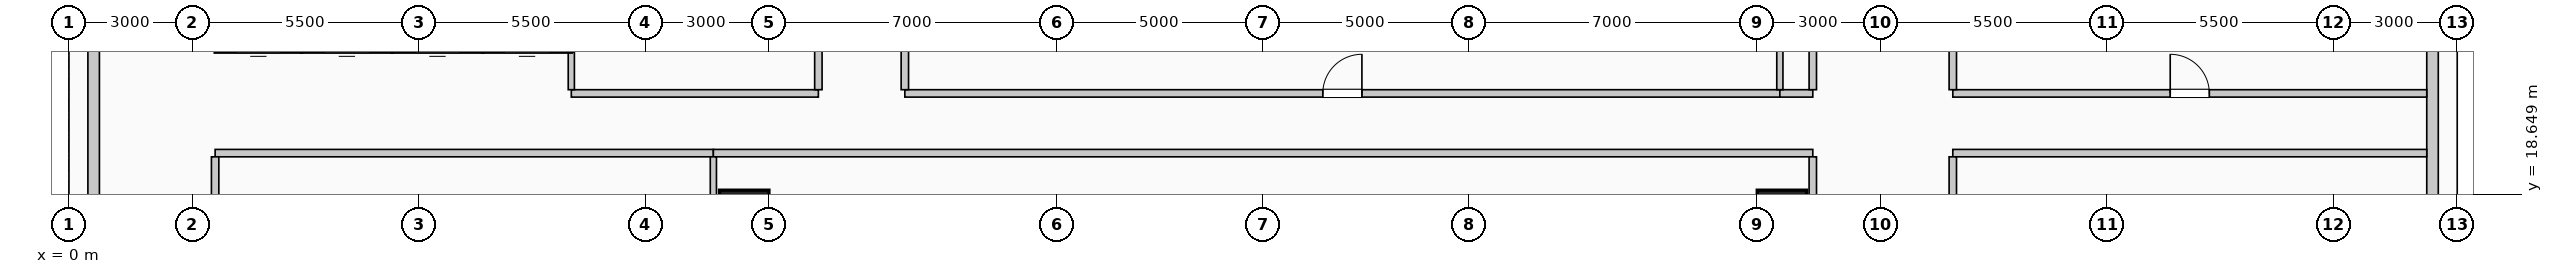
"""IFC4 building model, lengths in metres.
Left out: names, types, materials, properties, quantities, classifications, styles, units other than length and angle.
Written with IfcOpenShell. Run it as: python <this file> out.ifc"""

import sys

from ifc_helpers import new_model, si_unit, direction, frame, frame_2d, origin, origin_2d, place, context, subcontext, project, spatial, rectangle, extrude, element, fill, save


model = new_model("IFC4")
c1 = context("Model", 3, precision=1e-05, world=origin(), true_north=direction((0.0, 1.0)))
c2 = subcontext(c1, "Body", "Model", "MODEL_VIEW")
j1 = project(units=[si_unit("LENGTHUNIT", "METRE"), si_unit("PLANEANGLEUNIT", "RADIAN")], contexts=[c1])
p1 = place(None, origin())
s1 = spatial("IfcSite", under=j1, at=p1, CompositionType="ELEMENT")
p2 = place(p1, origin())
s2 = spatial("IfcBuilding", under=s1, at=p2, CompositionType="ELEMENT")
p3 = place(p2, frame((0.0, 0.0, 54.6)))
s3 = spatial("IfcBuildingStorey", under=s2, at=p3, CompositionType="ELEMENT", Elevation=54.6)
for number, where, z_axis, x_axis in (
    (1, (16.4, 18.0, 0.0), (0.0, 0.0, 1.0), (1.0, 0.0, 0.0)),
    (2, (41.6, 18.0, 0.0), (0.0, 0.0, 1.0), (1.0, 0.0, 0.0)),
):
    element("IfcColumn", number, at=place(p3, frame(where, z_axis=z_axis, x_axis=x_axis)), inside=s3, PredefinedType="COLUMN", context=c2, shape_type="SweptSolid", body=[
        extrude(rectangle(XDim=1.2, YDim=1.5, at=origin_2d()), origin(), (0.0, 0.0, 1.0), 4.0),
    ])
for number, where, z_axis, x_axis in (
    (3, (0.6, 18.47, 0.0), (0.0, 0.0, 1.0), (0.0, 1.0, 0.0)),
    (4, (57.4, 25.53, 0.0), (0.0, 0.0, 1.0), (0.0, -1.0, 0.0)),
):
    element("IfcWall", number, at=place(p3, frame(where, z_axis=z_axis, x_axis=x_axis)), inside=s3, PredefinedType="SOLIDWALL", context=c2, shape_type="SweptSolid", body=[
        extrude(rectangle(XDim=7.06, YDim=0.28, at=frame_2d((3.53, 0.0))), origin(), (0.0, 0.0, 1.0), 2.85),
    ])
p4 = place(p3, frame((5.65, 22.25, 0.0), z_axis=(0.0, 0.0, 1.0), x_axis=(-1.0, 0.0, 0.0)))
e5 = element("IfcWall", 5, at=p4, inside=s3, PredefinedType="SOLIDWALL", context=c2, shape_type="SweptSolid", body=[
    extrude(rectangle(XDim=2.1, YDim=0.3, at=frame_2d((1.05, 0.0))), origin(), (0.0, 0.0, 1.0), 4.0),
])
p5 = place(p4, frame((0.5, 0.0, 0.0)))
e6 = element("IfcOpeningElement", 6, at=p5, cuts=e5, PredefinedType="OPENING", context=c2, shape_type="SweptSolid", body=[
    extrude(rectangle(XDim=1.1, YDim=2.2, at=frame_2d((0.55, 1.1))), frame((0.0, 0.16, 0.0), z_axis=(0.0, -1.0, 0.0), x_axis=(1.0, 0.0, 0.0)), (0.0, 0.0, 1.0), 0.32),
])
p6 = place(p3, frame((7.85, 22.25, 0.0), z_axis=(0.0, 0.0, 1.0), x_axis=(-1.0, 0.0, 0.0)))
e7 = element("IfcWall", 7, at=p6, inside=s3, PredefinedType="SOLIDWALL", context=c2, shape_type="SweptSolid", body=[
    extrude(rectangle(XDim=2.2, YDim=0.3, at=frame_2d((1.1, 0.0))), origin(), (0.0, 0.0, 1.0), 4.0),
])
p7 = place(p6, frame((0.55, 0.0, 0.0)))
e8 = element("IfcOpeningElement", 8, at=p7, cuts=e7, PredefinedType="OPENING", context=c2, shape_type="SweptSolid", body=[
    extrude(rectangle(XDim=1.1, YDim=2.2, at=frame_2d((0.55, 1.1))), frame((0.0, 0.16, 0.0), z_axis=(0.0, -1.0, 0.0), x_axis=(1.0, 0.0, 0.0)), (0.0, 0.0, 1.0), 0.32),
])
p8 = place(p3, frame((10.05, 22.25, 0.0), z_axis=(0.0, 0.0, 1.0), x_axis=(-1.0, 0.0, 0.0)))
e9 = element("IfcWall", 9, at=p8, inside=s3, PredefinedType="SOLIDWALL", context=c2, shape_type="SweptSolid", body=[
    extrude(rectangle(XDim=2.2, YDim=0.3, at=frame_2d((1.1, 0.0))), origin(), (0.0, 0.0, 1.0), 4.0),
])
p9 = place(p8, frame((0.55, 0.0, 0.0)))
e10 = element("IfcOpeningElement", 10, at=p9, cuts=e9, PredefinedType="OPENING", context=c2, shape_type="SweptSolid", body=[
    extrude(rectangle(XDim=1.1, YDim=2.2, at=frame_2d((0.55, 1.1))), frame((0.0, 0.16, 0.0), z_axis=(0.0, -1.0, 0.0), x_axis=(1.0, 0.0, 0.0)), (0.0, 0.0, 1.0), 0.32),
])
p10 = place(p3, frame((12.2, 22.25, 0.0), z_axis=(0.0, 0.0, 1.0), x_axis=(-1.0, 0.0, 0.0)))
e11 = element("IfcWall", 11, at=p10, inside=s3, PredefinedType="SOLIDWALL", context=c2, shape_type="SweptSolid", body=[
    extrude(rectangle(XDim=2.15, YDim=0.3, at=frame_2d((1.075, 0.0))), origin(), (0.0, 0.0, 1.0), 4.0),
])
p11 = place(p10, frame((0.525, 0.0, 0.0)))
e12 = element("IfcOpeningElement", 12, at=p11, cuts=e11, PredefinedType="OPENING", context=c2, shape_type="SweptSolid", body=[
    extrude(rectangle(XDim=1.1, YDim=2.2, at=frame_2d((0.55, 1.1))), frame((0.0, 0.16, 0.0), z_axis=(0.0, -1.0, 0.0), x_axis=(1.0, 0.0, 0.0)), (0.0, 0.0, 1.0), 0.32),
])
p12 = place(p3, frame((3.55, 19.65, 0.0), z_axis=(0.0, 0.0, 1.0), x_axis=(1.0, 0.0, 0.0)))
e13 = element("IfcWall", 13, at=p12, inside=s3, PredefinedType="PARTITIONING", context=c2, shape_type="SweptSolid", body=[
    extrude(rectangle(XDim=12.1, YDim=0.18, at=frame_2d((6.05, 0.0))), origin(), (0.0, 0.0, 1.0), 3.7),
])
p13 = place(p3, frame((15.65, 19.65, 0.0), z_axis=(0.0, 0.0, 1.0), x_axis=(1.0, 0.0, 0.0)))
e14 = element("IfcWall", 14, at=p13, inside=s3, PredefinedType="PARTITIONING", context=c2, shape_type="SweptSolid", body=[
    extrude(rectangle(XDim=26.7, YDim=0.18, at=frame_2d((13.35, 0.0))), origin(), (0.0, 0.0, 1.0), 3.7),
])
p14 = place(p3, frame((45.75, 19.65, 0.0), z_axis=(0.0, 0.0, 1.0), x_axis=(1.0, 0.0, 0.0)))
e15 = element("IfcWall", 15, at=p14, inside=s3, PredefinedType="PARTITIONING", context=c2, shape_type="SweptSolid", body=[
    extrude(rectangle(XDim=11.51, YDim=0.18, at=frame_2d((5.755, 0.0))), origin(), (0.0, 0.0, 1.0), 3.7),
])
p15 = place(p3, frame((12.2, 21.1, 0.0), z_axis=(0.0, 0.0, 1.0), x_axis=(1.0, 0.0, 0.0)))
e16 = element("IfcWall", 16, at=p15, inside=s3, PredefinedType="PARTITIONING", context=c2, shape_type="SweptSolid", body=[
    extrude(rectangle(XDim=6.0, YDim=0.18, at=frame_2d((3.0, 0.0))), origin(), (0.0, 0.0, 1.0), 3.7),
])
p16 = place(p3, frame((20.3, 21.1, 0.0), z_axis=(0.0, 0.0, 1.0), x_axis=(1.0, 0.0, 0.0)))
e17 = element("IfcWall", 17, at=p16, inside=s3, PredefinedType="PARTITIONING", context=c2, shape_type="SweptSolid", body=[
    extrude(rectangle(XDim=21.25, YDim=0.18, at=frame_2d((10.625, 0.0))), origin(), (0.0, 0.0, 1.0), 3.7),
])
p17 = place(p16, frame((10.15, 0.0, 0.0)))
e18 = element("IfcOpeningElement", 18, at=p17, cuts=e17, PredefinedType="OPENING", context=c2, shape_type="SweptSolid", body=[
    extrude(rectangle(XDim=0.95, YDim=2.15, at=frame_2d((0.475, 1.075))), frame((0.0, 0.1, 0.0), z_axis=(0.0, -1.0, 0.0), x_axis=(1.0, 0.0, 0.0)), (0.0, 0.0, 1.0), 0.2),
])
p18 = place(p3, frame((41.55, 21.1, 0.0), z_axis=(0.0, 0.0, 1.0), x_axis=(1.0, 0.0, 0.0)))
e19 = element("IfcWall", 19, at=p18, inside=s3, PredefinedType="PARTITIONING", context=c2, shape_type="SweptSolid", body=[
    extrude(rectangle(XDim=0.8, YDim=0.18, at=frame_2d((0.4, 0.0))), origin(), (0.0, 0.0, 1.0), 3.7),
])
p19 = place(p3, frame((45.75, 21.1, 0.0), z_axis=(0.0, 0.0, 1.0), x_axis=(1.0, 0.0, 0.0)))
e20 = element("IfcWall", 20, at=p19, inside=s3, PredefinedType="PARTITIONING", context=c2, shape_type="SweptSolid", body=[
    extrude(rectangle(XDim=11.51, YDim=0.18, at=frame_2d((5.755, 0.0))), origin(), (0.0, 0.0, 1.0), 3.7),
])
p20 = place(p19, frame((5.28, 0.0, 0.0)))
e21 = element("IfcOpeningElement", 21, at=p20, cuts=e20, PredefinedType="OPENING", context=c2, shape_type="SweptSolid", body=[
    extrude(rectangle(XDim=0.95, YDim=2.15, at=frame_2d((0.475, 1.075))), frame((0.0, 0.1, 0.0), z_axis=(0.0, -1.0, 0.0), x_axis=(1.0, 0.0, 0.0)), (0.0, 0.0, 1.0), 0.2),
])
p21 = place(p3, frame((3.55, 16.39, 0.0), z_axis=(0.0, 0.0, 1.0), x_axis=(0.0, 1.0, 0.0)))
e22 = element("IfcWall", 22, at=p21, inside=s3, PredefinedType="PARTITIONING", context=c2, shape_type="SweptSolid", body=[
    extrude(rectangle(XDim=3.17, YDim=0.18, at=frame_2d((1.585, 0.0))), origin(), (0.0, 0.0, 1.0), 3.7),
])
p22 = place(p3, frame((12.2, 21.19, 0.0), z_axis=(0.0, 0.0, 1.0), x_axis=(0.0, 1.0, 0.0)))
e23 = element("IfcWall", 23, at=p22, inside=s3, PredefinedType="PARTITIONING", context=c2, shape_type="SweptSolid", body=[
    extrude(rectangle(XDim=0.91, YDim=0.15, at=frame_2d((0.455, 0.0))), origin(), (0.0, 0.0, 1.0), 3.7),
])
p23 = place(p3, frame((15.65, 16.39, 0.0), z_axis=(0.0, 0.0, 1.0), x_axis=(0.0, 1.0, 0.0)))
e24 = element("IfcWall", 24, at=p23, inside=s3, PredefinedType="PARTITIONING", context=c2, shape_type="SweptSolid", body=[
    extrude(rectangle(XDim=3.17, YDim=0.15, at=frame_2d((1.585, 0.0))), origin(), (0.0, 0.0, 1.0), 3.7),
])
for number, where, z_axis, x_axis in (
    (25, (18.2, 21.19, 0.0), (0.0, 0.0, 1.0), (0.0, 1.0, 0.0)),
    (26, (20.3, 21.19, 0.0), (0.0, 0.0, 1.0), (0.0, 1.0, 0.0)),
):
    element("IfcWall", number, at=place(p3, frame(where, z_axis=z_axis, x_axis=x_axis)), inside=s3, PredefinedType="PARTITIONING", context=c2, shape_type="SweptSolid", body=[
        extrude(rectangle(XDim=10.52, YDim=0.18, at=frame_2d((5.26, 0.0))), origin(), (0.0, 0.0, 1.0), 3.7),
    ])
p24 = place(p3, frame((41.55, 21.19, 0.0), z_axis=(0.0, 0.0, 1.0), x_axis=(0.0, 1.0, 0.0)))
e27 = element("IfcWall", 27, at=p24, inside=s3, PredefinedType="PARTITIONING", context=c2, shape_type="SweptSolid", body=[
    extrude(rectangle(XDim=4.06, YDim=0.15, at=frame_2d((2.03, 0.0))), origin(), (0.0, 0.0, 1.0), 2.995),
])
p25 = place(p3, frame((42.35, 16.39, 0.0), z_axis=(0.0, 0.0, 1.0), x_axis=(0.0, 1.0, 0.0)))
e28 = element("IfcWall", 28, at=p25, inside=s3, PredefinedType="PARTITIONING", context=c2, shape_type="SweptSolid", body=[
    extrude(rectangle(XDim=3.17, YDim=0.18, at=frame_2d((1.585, 0.0))), origin(), (0.0, 0.0, 1.0), 3.7),
])
p26 = place(p3, frame((42.35, 21.19, 0.0), z_axis=(0.0, 0.0, 1.0), x_axis=(0.0, 1.0, 0.0)))
e29 = element("IfcWall", 29, at=p26, inside=s3, PredefinedType="PARTITIONING", context=c2, shape_type="SweptSolid", body=[
    extrude(rectangle(XDim=11.085, YDim=0.18, at=frame_2d((5.542, 0.0))), origin(), (0.0, 0.0, 1.0), 3.7),
])
p27 = place(p3, frame((45.75, 16.39, 0.0), z_axis=(0.0, 0.0, 1.0), x_axis=(0.0, 1.0, 0.0)))
e30 = element("IfcWall", 30, at=p27, inside=s3, PredefinedType="PARTITIONING", context=c2, shape_type="SweptSolid", body=[
    extrude(rectangle(XDim=3.17, YDim=0.18, at=frame_2d((1.585, 0.0))), origin(), (0.0, 0.0, 1.0), 3.7),
])
p28 = place(p3, frame((45.75, 21.19, 0.0), z_axis=(0.0, 0.0, 1.0), x_axis=(0.0, 1.0, 0.0)))
e31 = element("IfcWall", 31, at=p28, inside=s3, PredefinedType="PARTITIONING", context=c2, shape_type="SweptSolid", body=[
    extrude(rectangle(XDim=11.085, YDim=0.18, at=frame_2d((5.542, 0.0))), origin(), (0.0, 0.0, 1.0), 3.7),
])
p29 = place(p17, origin())
e32 = element("IfcDoor", 32, at=p29, inside=s3, OperationType="SINGLE_SWING_RIGHT", PredefinedType="DOOR", context=c2, shape_type="SweptSolid", body=[
    extrude(rectangle(XDim=0.95, YDim=2.15, at=frame_2d((0.475, 1.075))), frame((0.0, 0.025, 0.0), z_axis=(0.0, -1.0, 0.0), x_axis=(1.0, 0.0, 0.0)), (0.0, 0.0, 1.0), 0.05),
])
fill(e18, e32)
p30 = place(p20, origin())
e33 = element("IfcDoor", 33, at=p30, inside=s3, OperationType="SINGLE_SWING_LEFT", PredefinedType="DOOR", context=c2, shape_type="SweptSolid", body=[
    extrude(rectangle(XDim=0.95, YDim=2.15, at=frame_2d((0.475, 1.075))), frame((0.0, 0.025, 0.0), z_axis=(0.0, -1.0, 0.0), x_axis=(1.0, 0.0, 0.0)), (0.0, 0.0, 1.0), 0.05),
])
fill(e21, e33)
save(model, sys.argv[1])
